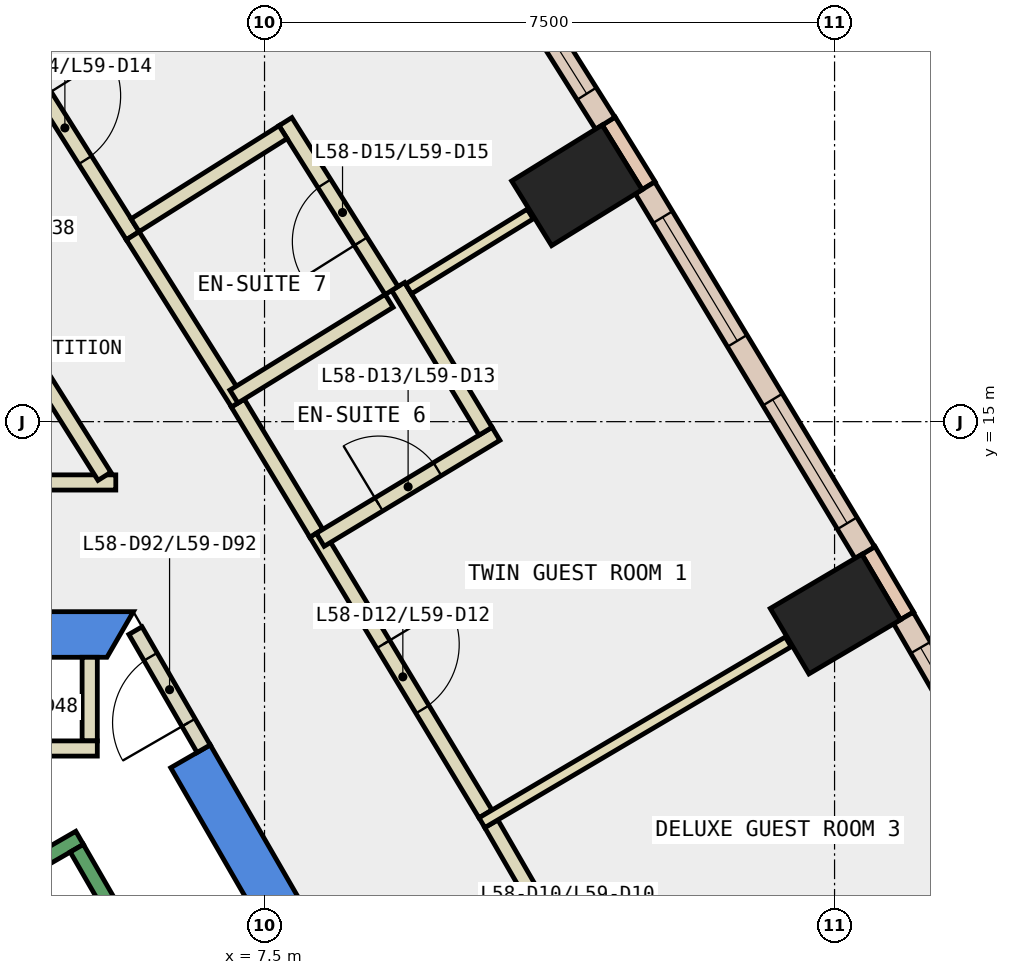
"""IFC4 building model, lengths in metres.
Left out: names, types, materials, properties, quantities, classifications, styles, units other than length and angle.
Written with IfcOpenShell. Run it as: python <this file> out.ifc"""

import sys

from ifc_helpers import new_model, si_unit, direction, frame, frame_2d, origin, origin_2d, place, context, subcontext, project, spatial, polyline, rectangle, outline, extrude, element, fill, save


model = new_model("IFC4")
c1 = context("Model", 3, precision=1e-05, world=origin(), true_north=direction((0.0, 1.0)))
c2 = subcontext(c1, "Body", "Model", "MODEL_VIEW")
j1 = project(units=[si_unit("LENGTHUNIT", "METRE"), si_unit("PLANEANGLEUNIT", "RADIAN")], contexts=[c1])
p1 = place(None, origin())
s1 = spatial("IfcSite", under=j1, at=p1, CompositionType="ELEMENT")
p2 = place(p1, origin())
s2 = spatial("IfcBuilding", under=s1, at=p2, CompositionType="ELEMENT")
p3 = place(p2, frame((0.0, 0.0, 255.8)))
s3 = spatial("IfcBuildingStorey", under=s2, at=p3, CompositionType="ELEMENT", Elevation=255.8)
for number, where, z_axis, x_axis in (
    (1, (15.011, 12.468, -0.34), (0.0, 0.0, 1.0), (-0.509, 0.861, 0.0)),
    (2, (11.61, 18.109, -0.34), (0.0, 0.0, 1.0), (-0.526, 0.851, 0.0)),
):
    element("IfcColumn", number, at=place(p3, frame(where, z_axis=z_axis, x_axis=x_axis)), inside=s3, PredefinedType="COLUMN", context=c2, shape_type="SweptSolid", body=[
        extrude(rectangle(XDim=1.0, YDim=1.4, at=origin_2d()), origin(), (0.0, 0.0, 1.0), 3.6),
    ])
p4 = place(p3, frame((0.0, 0.0, -0.34)))
e3 = element("IfcWall", 3, at=p4, inside=s3, PredefinedType="SHEAR", context=c2, shape_type="SweptSolid", body=[
    extrude(outline(polyline([(6.786, 10.747), (6.266, 10.447), (10.854, 2.5), (11.547, 2.5), (6.786, 10.747)])), origin(), (0.0, 0.0, 1.0), 3.6),
])
p5 = place(p3, frame((0.0, 0.0, -0.34)))
e4 = element("IfcWall", 4, at=p5, inside=s3, PredefinedType="SHEAR", context=c2, shape_type="SweptSolid", body=[
    extrude(outline(polyline([(5.774, 12.5), (-5.774, 12.5), (-5.427, 11.9), (5.427, 11.9), (5.774, 12.5)])), origin(), (0.0, 0.0, 1.0), 3.6),
])
p6 = place(p3, frame((15.954, 12.445, 0.0), z_axis=(0.0, 0.0, 1.0), x_axis=(-0.508268432768, 0.861198699634, 0.0)))
e5 = element("IfcWall", 5, at=p6, inside=s3, PredefinedType="STANDARD", context=c2, shape_type="SweptSolid", body=[
    extrude(rectangle(XDim=1.0, YDim=0.2, at=frame_2d((0.5, 0.0))), origin(), (0.0, 0.0, 1.0), 3.26),
])
p7 = place(p3, frame((12.554, 18.104, 0.0), z_axis=(0.0, 0.0, 1.0), x_axis=(-0.525648735675, 0.850701714282, 0.0)))
e6 = element("IfcWall", 6, at=p7, inside=s3, PredefinedType="STANDARD", context=c2, shape_type="SweptSolid", body=[
    extrude(rectangle(XDim=1.0, YDim=0.2, at=frame_2d((0.5, 0.0))), origin(), (0.0, 0.0, 1.0), 3.26),
])
p8 = place(p3, frame((18.708, 7.566, 0.0), z_axis=(0.0, 0.0, 1.0), x_axis=(-0.500089564757, 0.865973687372, 0.0)))
e7 = element("IfcWall", 7, at=p8, inside=s3, PredefinedType="STANDARD", context=c2, shape_type="SweptSolid", body=[
    extrude(rectangle(XDim=5.603, YDim=0.3, at=frame_2d((2.802, 0.0))), origin(), (0.0, 0.0, 1.0), 3.26),
])
p9 = place(p8, frame((0.451, 0.0, 0.9)))
e8 = element("IfcOpeningElement", 8, at=p9, cuts=e7, PredefinedType="OPENING", context=c2, shape_type="SweptSolid", body=[
    extrude(rectangle(XDim=1.9, YDim=2.0, at=frame_2d((0.95, 1.0))), frame((0.0, 0.16, 0.0), z_axis=(0.0, -1.0, 0.0), x_axis=(1.0, 0.0, 0.0)), (0.0, 0.0, 1.0), 0.32),
])
p10 = place(p8, frame((3.252, 0.0, 0.9)))
e9 = element("IfcOpeningElement", 9, at=p10, cuts=e7, PredefinedType="OPENING", context=c2, shape_type="SweptSolid", body=[
    extrude(rectangle(XDim=1.9, YDim=2.0, at=frame_2d((0.95, 1.0))), frame((0.0, 0.16, 0.0), z_axis=(0.0, -1.0, 0.0), x_axis=(1.0, 0.0, 0.0)), (0.0, 0.0, 1.0), 0.32),
])
p11 = place(p3, frame((15.399, 13.277, 0.0), z_axis=(0.0, 0.0, 1.0), x_axis=(-0.516269519619, 0.856426169096, 0.0)))
e10 = element("IfcWall", 10, at=p11, inside=s3, PredefinedType="STANDARD", context=c2, shape_type="SweptSolid", body=[
    extrude(rectangle(XDim=5.603, YDim=0.3, at=frame_2d((2.802, 0.0))), origin(), (0.0, 0.0, 1.0), 3.26),
])
p12 = place(p11, frame((0.451, 0.0, 0.9)))
e11 = element("IfcOpeningElement", 11, at=p12, cuts=e10, PredefinedType="OPENING", context=c2, shape_type="SweptSolid", body=[
    extrude(rectangle(XDim=1.9, YDim=2.0, at=frame_2d((0.95, 1.0))), frame((0.0, 0.16, 0.0), z_axis=(0.0, -1.0, 0.0), x_axis=(1.0, 0.0, 0.0)), (0.0, 0.0, 1.0), 0.32),
])
p13 = place(p11, frame((3.253, 0.0, 0.9)))
e12 = element("IfcOpeningElement", 12, at=p13, cuts=e10, PredefinedType="OPENING", context=c2, shape_type="SweptSolid", body=[
    extrude(rectangle(XDim=1.9, YDim=2.0, at=frame_2d((0.95, 1.0))), frame((0.0, 0.16, 0.0), z_axis=(0.0, -1.0, 0.0), x_axis=(1.0, 0.0, 0.0)), (0.0, 0.0, 1.0), 0.32),
])
p14 = place(p3, frame((11.983, 18.926, 0.0), z_axis=(0.0, 0.0, 1.0), x_axis=(-0.532558226688, 0.846393369059, 0.0)))
e13 = element("IfcWall", 13, at=p14, inside=s3, PredefinedType="STANDARD", context=c2, shape_type="SweptSolid", body=[
    extrude(rectangle(XDim=5.637, YDim=0.3, at=frame_2d((2.818, 0.0))), origin(), (0.0, 0.0, 1.0), 3.26),
])
p15 = place(p14, frame((0.459, 0.0, 0.9)))
e14 = element("IfcOpeningElement", 14, at=p15, cuts=e13, PredefinedType="OPENING", context=c2, shape_type="SweptSolid", body=[
    extrude(rectangle(XDim=1.9, YDim=2.0, at=frame_2d((0.95, 1.0))), frame((0.0, 0.16, 0.0), z_axis=(0.0, -1.0, 0.0), x_axis=(1.0, 0.0, 0.0)), (0.0, 0.0, 1.0), 0.32),
])
p16 = place(p14, frame((3.278, 0.0, 0.9)))
e15 = element("IfcOpeningElement", 15, at=p16, cuts=e13, PredefinedType="OPENING", context=c2, shape_type="SweptSolid", body=[
    extrude(rectangle(XDim=1.9, YDim=2.0, at=frame_2d((0.95, 1.0))), frame((0.0, 0.16, 0.0), z_axis=(0.0, -1.0, 0.0), x_axis=(1.0, 0.0, 0.0)), (0.0, 0.0, 1.0), 0.32),
])
p17 = place(p3, frame((0.4, 14.2, 0.0), z_axis=(0.0, 0.0, 1.0), x_axis=(1.0, 0.0, 0.0)))
e16 = element("IfcWall", 16, at=p17, inside=s3, PredefinedType="PARTITIONING", context=c2, shape_type="SweptSolid", body=[
    extrude(rectangle(XDim=5.143, YDim=0.2, at=frame_2d((2.572, 0.0))), origin(), (0.0, 0.0, 1.0), 3.26),
])
p18 = place(p3, frame((5.394, 14.281, 0.0), z_axis=(0.0, 0.0, 1.0), x_axis=(-0.532551510955, 0.846397594621, 0.0)))
e17 = element("IfcWall", 17, at=p18, inside=s3, PredefinedType="PARTITIONING", context=c2, shape_type="SweptSolid", body=[
    extrude(rectangle(XDim=5.789, YDim=0.2, at=frame_2d((2.895, 0.0))), origin(), (0.0, 0.0, 1.0), 3.26),
])
p19 = place(p18, frame((2.394, 0.0, 0.0)))
e18 = element("IfcOpeningElement", 18, at=p19, cuts=e17, PredefinedType="OPENING", context=c2, shape_type="SweptSolid", body=[
    extrude(rectangle(XDim=1.0, YDim=2.1, at=frame_2d((0.5, 1.05))), frame((0.0, 0.11, 0.0), z_axis=(0.0, -1.0, 0.0), x_axis=(1.0, 0.0, 0.0)), (0.0, 0.0, 1.0), 0.22),
])
p20 = place(p3, frame((10.484, 9.71, 0.0), z_axis=(0.0, 0.0, 1.0), x_axis=(0.500034145141, -0.866005689181, 0.0)))
e19 = element("IfcWall", 19, at=p20, inside=s3, PredefinedType="PARTITIONING", context=c2, shape_type="SweptSolid", body=[
    extrude(rectangle(XDim=3.91, YDim=0.2, at=frame_2d((1.955, 0.0))), origin(), (0.0, 0.0, 1.0), 3.26),
])
p21 = place(p20, frame((1.505, 0.0, 0.0)))
e20 = element("IfcOpeningElement", 20, at=p21, cuts=e19, PredefinedType="OPENING", context=c2, shape_type="SweptSolid", body=[
    extrude(rectangle(XDim=1.0, YDim=2.1, at=frame_2d((0.5, 1.05))), frame((0.0, 0.11, 0.0), z_axis=(0.0, -1.0, 0.0), x_axis=(1.0, 0.0, 0.0)), (0.0, 0.0, 1.0), 0.22),
])
p22 = place(p3, frame((8.181, 13.532, 0.0), z_axis=(0.0, 0.0, 1.0), x_axis=(0.51625987265, -0.856431984393, 0.0)))
e21 = element("IfcWall", 21, at=p22, inside=s3, PredefinedType="PARTITIONING", context=c2, shape_type="SweptSolid", body=[
    extrude(rectangle(XDim=4.312, YDim=0.2, at=frame_2d((2.156, 0.0))), origin(), (0.0, 0.0, 1.0), 3.26),
])
p23 = place(p22, frame((1.706, 0.0, 0.0)))
e22 = element("IfcOpeningElement", 22, at=p23, cuts=e21, PredefinedType="OPENING", context=c2, shape_type="SweptSolid", body=[
    extrude(rectangle(XDim=1.0, YDim=2.1, at=frame_2d((0.5, 1.05))), frame((0.0, 0.11, 0.0), z_axis=(0.0, -1.0, 0.0), x_axis=(1.0, 0.0, 0.0)), (0.0, 0.0, 1.0), 0.22),
])
p24 = place(p3, frame((7.148, 15.245, 0.0), z_axis=(0.0, 0.0, 1.0), x_axis=(0.516361066184, -0.856370976463, 0.0)))
e23 = element("IfcWall", 23, at=p24, inside=s3, PredefinedType="PARTITIONING", context=c2, shape_type="SweptSolid", body=[
    extrude(rectangle(XDim=2.0, YDim=0.2, at=frame_2d((1.0, 0.0))), origin(), (0.0, 0.0, 1.0), 3.26),
])
p25 = place(p3, frame((3.928, 20.367, 0.0), z_axis=(0.0, 0.0, 1.0), x_axis=(0.532616247911, -0.846356858814, 0.0)))
e24 = element("IfcWall", 24, at=p25, inside=s3, PredefinedType="PARTITIONING", context=c2, shape_type="SweptSolid", body=[
    extrude(rectangle(XDim=3.451, YDim=0.2, at=frame_2d((1.726, 0.0))), origin(), (0.0, 0.0, 1.0), 3.26),
])
p26 = place(p25, frame((1.275, 0.0, 0.0)))
e25 = element("IfcOpeningElement", 25, at=p26, cuts=e24, PredefinedType="OPENING", context=c2, shape_type="SweptSolid", body=[
    extrude(rectangle(XDim=1.0, YDim=2.1, at=frame_2d((0.5, 1.05))), frame((0.0, 0.11, 0.0), z_axis=(0.0, -1.0, 0.0), x_axis=(1.0, 0.0, 0.0)), (0.0, 0.0, 1.0), 0.22),
])
p27 = place(p3, frame((5.766, 17.446, 0.0), z_axis=(0.0, 0.0, 1.0), x_axis=(0.532437006176, -0.846469629966, 0.0)))
e26 = element("IfcWall", 26, at=p27, inside=s3, PredefinedType="PARTITIONING", context=c2, shape_type="SweptSolid", body=[
    extrude(rectangle(XDim=2.599, YDim=0.2, at=frame_2d((1.299, 0.0))), origin(), (0.0, 0.0, 1.0), 3.26),
])
p28 = place(p3, frame((5.2, 11.9, 0.0), z_axis=(0.0, 0.0, 1.0), x_axis=(0.0, -1.0, 0.0)))
e27 = element("IfcWall", 27, at=p28, inside=s3, PredefinedType="PARTITIONING", context=c2, shape_type="SweptSolid", body=[
    extrude(rectangle(XDim=1.1, YDim=0.2, at=frame_2d((0.55, 0.0))), origin(), (0.0, 0.0, 1.0), 3.26),
])
p29 = place(p3, frame((5.3, 10.7, 0.0), z_axis=(0.0, 0.0, 1.0), x_axis=(-1.0, 0.0, 0.0)))
e28 = element("IfcWall", 28, at=p29, inside=s3, PredefinedType="PARTITIONING", context=c2, shape_type="SweptSolid", body=[
    extrude(rectangle(XDim=2.8, YDim=0.2, at=frame_2d((1.4, 0.0))), origin(), (0.0, 0.0, 1.0), 3.26),
])
p30 = place(p29, frame((0.95, 0.0, 0.0)))
e29 = element("IfcOpeningElement", 29, at=p30, cuts=e28, PredefinedType="OPENING", context=c2, shape_type="SweptSolid", body=[
    extrude(rectangle(XDim=0.9, YDim=2.1, at=frame_2d((0.45, 1.05))), frame((0.0, 0.11, 0.0), z_axis=(0.0, -1.0, 0.0), x_axis=(1.0, 0.0, 0.0)), (0.0, 0.0, 1.0), 0.22),
])
p31 = place(p3, frame((10.36, 9.724, 0.0), z_axis=(0.0, 0.0, 1.0), x_axis=(0.861211954005, 0.508245974188, 0.0)))
e30 = element("IfcWall", 30, at=p31, inside=s3, PredefinedType="PARTITIONING", context=c2, shape_type="SweptSolid", body=[
    extrude(rectangle(XDim=4.681, YDim=0.15, at=frame_2d((2.34, 0.0))), origin(), (0.0, 0.0, 1.0), 3.26),
])
p32 = place(p3, frame((8.233, 13.446, 0.0), z_axis=(0.0, 0.0, 1.0), x_axis=(0.856373825811, 0.516356340589, 0.0)))
e31 = element("IfcWall", 31, at=p32, inside=s3, PredefinedType="PARTITIONING", context=c2, shape_type="SweptSolid", body=[
    extrude(rectangle(XDim=2.7, YDim=0.2, at=frame_2d((1.35, 0.0))), origin(), (0.0, 0.0, 1.0), 3.26),
])
p33 = place(p32, frame((0.9, 0.0, 0.0)))
e32 = element("IfcOpeningElement", 32, at=p33, cuts=e31, PredefinedType="OPENING", context=c2, shape_type="SweptSolid", body=[
    extrude(rectangle(XDim=0.9, YDim=2.1, at=frame_2d((0.45, 1.05))), frame((0.0, 0.11, 0.0), z_axis=(0.0, -1.0, 0.0), x_axis=(1.0, 0.0, 0.0)), (0.0, 0.0, 1.0), 0.22),
])
p34 = place(p3, frame((10.408, 14.874, 0.0), z_axis=(0.0, 0.0, 1.0), x_axis=(-0.516768967276, 0.856124894195, 0.0)))
e33 = element("IfcWall", 33, at=p34, inside=s3, PredefinedType="PARTITIONING", context=c2, shape_type="SweptSolid", body=[
    extrude(rectangle(XDim=2.225, YDim=0.2, at=frame_2d((1.113, 0.0))), origin(), (0.0, 0.0, 1.0), 3.26),
])
p35 = place(p3, frame((9.395, 16.746, 0.0), z_axis=(0.0, 0.0, 1.0), x_axis=(0.851524542888, 0.524314745987, 0.0)))
e34 = element("IfcWall", 34, at=p35, inside=s3, PredefinedType="PARTITIONING", context=c2, shape_type="SweptSolid", body=[
    extrude(rectangle(XDim=1.88, YDim=0.15, at=frame_2d((0.94, 0.0))), origin(), (0.0, 0.0, 1.0), 3.26),
])
p36 = place(p3, frame((7.097, 15.33, 0.0), z_axis=(0.0, 0.0, 1.0), x_axis=(0.851207242031, 0.524829716302, 0.0)))
e35 = element("IfcWall", 35, at=p36, inside=s3, PredefinedType="PARTITIONING", context=c2, shape_type="SweptSolid", body=[
    extrude(rectangle(XDim=2.399, YDim=0.2, at=frame_2d((1.199, 0.0))), origin(), (0.0, 0.0, 1.0), 3.26),
])
p37 = place(p3, frame((9.172, 16.725, 0.0), z_axis=(0.0, 0.0, 1.0), x_axis=(-0.532329646536, 0.846537150643, 0.0)))
e36 = element("IfcWall", 36, at=p37, inside=s3, PredefinedType="PARTITIONING", context=c2, shape_type="SweptSolid", body=[
    extrude(rectangle(XDim=2.625, YDim=0.2, at=frame_2d((1.312, 0.0))), origin(), (0.0, 0.0, 1.0), 3.26),
])
p38 = place(p37, frame((0.763, 0.0, 0.0)))
e37 = element("IfcOpeningElement", 37, at=p38, cuts=e36, PredefinedType="OPENING", context=c2, shape_type="SweptSolid", body=[
    extrude(rectangle(XDim=0.9, YDim=2.1, at=frame_2d((0.45, 1.05))), frame((0.0, 0.11, 0.0), z_axis=(0.0, -1.0, 0.0), x_axis=(1.0, 0.0, 0.0)), (0.0, 0.0, 1.0), 0.22),
])
p39 = place(p3, frame((7.744, 18.809, 0.0), z_axis=(0.0, 0.0, 1.0), x_axis=(-0.846360434059, -0.532610566605, 0.0)))
e38 = element("IfcWall", 38, at=p39, inside=s3, PredefinedType="PARTITIONING", context=c2, shape_type="SweptSolid", body=[
    extrude(rectangle(XDim=2.3, YDim=0.2, at=frame_2d((1.15, 0.0))), origin(), (0.0, 0.0, 1.0), 3.26),
])
p40 = place(p3, frame((6.699, 10.697, 0.0), z_axis=(0.0, 0.0, 1.0), x_axis=(-0.499914839587, 0.866074565589, 0.0)))
e39 = element("IfcWall", 39, at=p40, inside=s3, PredefinedType="PARTITIONING", context=c2, shape_type="SweptSolid", body=[
    extrude(rectangle(XDim=1.794, YDim=0.2, at=frame_2d((0.897, 0.0))), origin(), (0.0, 0.0, 1.0), 2.4),
])
p41 = place(p40, frame((0.397, 0.0, 0.0)))
e40 = element("IfcOpeningElement", 40, at=p41, cuts=e39, PredefinedType="OPENING", context=c2, shape_type="SweptSolid", body=[
    extrude(rectangle(XDim=1.0, YDim=2.1, at=frame_2d((0.5, 1.05))), frame((0.0, 0.11, 0.0), z_axis=(0.0, -1.0, 0.0), x_axis=(1.0, 0.0, 0.0)), (0.0, 0.0, 1.0), 0.22),
])
p42 = place(p3, frame((2.7, 8.158, 0.0), z_axis=(0.0, 0.0, 1.0), x_axis=(0.86611865017, 0.499838457731, 0.0)))
e41 = element("IfcWall", 41, at=p42, inside=s3, PredefinedType="STANDARD", context=c2, shape_type="SweptSolid", body=[
    extrude(rectangle(XDim=2.733, YDim=0.2, at=frame_2d((1.366, 0.0))), origin(), (0.0, 0.0, 1.0), 3.26),
])
p43 = place(p3, frame((8.48, 3.412, 0.0), z_axis=(0.0, 0.0, 1.0), x_axis=(-0.499978703459, 0.866037698999, 0.0)))
e42 = element("IfcWall", 42, at=p43, inside=s3, PredefinedType="STANDARD", context=c2, shape_type="SweptSolid", body=[
    extrude(rectangle(XDim=6.9, YDim=0.2, at=frame_2d((3.45, 0.0))), origin(), (0.0, 0.0, 1.0), 3.26),
])
p44 = place(p10, origin())
e43 = element("IfcWindow", 43, at=p44, inside=s3, PartitioningType="SINGLE_PANEL", PredefinedType="WINDOW", context=c2, shape_type="SweptSolid", body=[
    extrude(rectangle(XDim=1.9, YDim=2.0, at=frame_2d((0.95, 1.0))), frame((0.0, 0.03, 0.0), z_axis=(0.0, -1.0, 0.0), x_axis=(1.0, 0.0, 0.0)), (0.0, 0.0, 1.0), 0.06),
])
fill(e9, e43)
p45 = place(p12, origin())
e44 = element("IfcWindow", 44, at=p45, inside=s3, PartitioningType="SINGLE_PANEL", PredefinedType="WINDOW", context=c2, shape_type="SweptSolid", body=[
    extrude(rectangle(XDim=1.9, YDim=2.0, at=frame_2d((0.95, 1.0))), frame((0.0, 0.03, 0.0), z_axis=(0.0, -1.0, 0.0), x_axis=(1.0, 0.0, 0.0)), (0.0, 0.0, 1.0), 0.06),
])
fill(e11, e44)
p46 = place(p13, origin())
e45 = element("IfcWindow", 45, at=p46, inside=s3, PartitioningType="SINGLE_PANEL", PredefinedType="WINDOW", context=c2, shape_type="SweptSolid", body=[
    extrude(rectangle(XDim=1.9, YDim=2.0, at=frame_2d((0.95, 1.0))), frame((0.0, 0.03, 0.0), z_axis=(0.0, -1.0, 0.0), x_axis=(1.0, 0.0, 0.0)), (0.0, 0.0, 1.0), 0.06),
])
fill(e12, e45)
p47 = place(p15, origin())
e46 = element("IfcWindow", 46, at=p47, inside=s3, PartitioningType="SINGLE_PANEL", PredefinedType="WINDOW", context=c2, shape_type="SweptSolid", body=[
    extrude(rectangle(XDim=1.9, YDim=2.0, at=frame_2d((0.95, 1.0))), frame((0.0, 0.03, 0.0), z_axis=(0.0, -1.0, 0.0), x_axis=(1.0, 0.0, 0.0)), (0.0, 0.0, 1.0), 0.06),
])
fill(e14, e46)
p48 = place(p23, origin())
e47 = element("IfcDoor", 47, at=p48, inside=s3, OperationType="SINGLE_SWING_LEFT", PredefinedType="DOOR", context=c2, shape_type="SweptSolid", body=[
    extrude(rectangle(XDim=1.0, YDim=2.1, at=frame_2d((0.5, 1.05))), frame((0.0, 0.025, 0.0), z_axis=(0.0, -1.0, 0.0), x_axis=(1.0, 0.0, 0.0)), (0.0, 0.0, 1.0), 0.05),
])
fill(e22, e47)
p49 = place(p33, origin())
e48 = element("IfcDoor", 48, at=p49, inside=s3, OperationType="SINGLE_SWING_LEFT", PredefinedType="DOOR", context=c2, shape_type="SweptSolid", body=[
    extrude(rectangle(XDim=0.9, YDim=2.1, at=frame_2d((0.45, 1.05))), frame((0.0, 0.025, 0.0), z_axis=(0.0, -1.0, 0.0), x_axis=(1.0, 0.0, 0.0)), (0.0, 0.0, 1.0), 0.05),
])
fill(e32, e48)
p50 = place(p26, origin())
e49 = element("IfcDoor", 49, at=p50, inside=s3, OperationType="SINGLE_SWING_LEFT", PredefinedType="DOOR", context=c2, shape_type="SweptSolid", body=[
    extrude(rectangle(XDim=1.0, YDim=2.1, at=frame_2d((0.5, 1.05))), frame((0.0, 0.025, 0.0), z_axis=(0.0, -1.0, 0.0), x_axis=(1.0, 0.0, 0.0)), (0.0, 0.0, 1.0), 0.05),
])
fill(e25, e49)
p51 = place(p38, origin())
e50 = element("IfcDoor", 50, at=p51, inside=s3, OperationType="SINGLE_SWING_LEFT", PredefinedType="DOOR", context=c2, shape_type="SweptSolid", body=[
    extrude(rectangle(XDim=0.9, YDim=2.1, at=frame_2d((0.45, 1.05))), frame((0.0, 0.025, 0.0), z_axis=(0.0, -1.0, 0.0), x_axis=(1.0, 0.0, 0.0)), (0.0, 0.0, 1.0), 0.05),
])
fill(e37, e50)
p52 = place(p41, origin())
e51 = element("IfcDoor", 51, at=p52, inside=s3, OperationType="SINGLE_SWING_LEFT", PredefinedType="DOOR", context=c2, shape_type="SweptSolid", body=[
    extrude(rectangle(XDim=1.0, YDim=2.1, at=frame_2d((0.5, 1.05))), frame((0.0, 0.025, 0.0), z_axis=(0.0, -1.0, 0.0), x_axis=(1.0, 0.0, 0.0)), (0.0, 0.0, 1.0), 0.05),
])
fill(e40, e51)
save(model, sys.argv[1])
